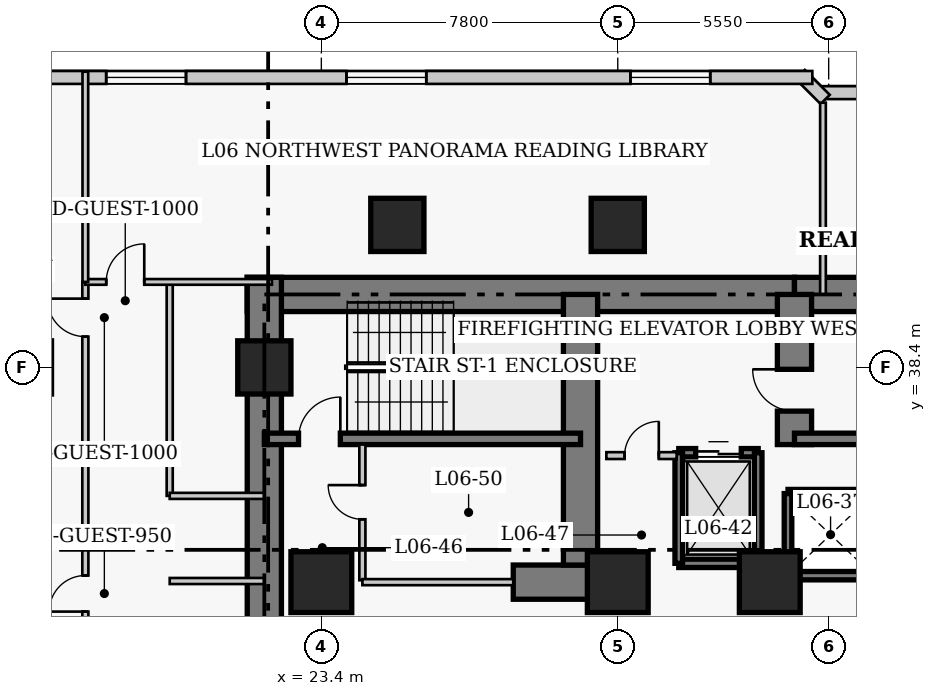
"""IFC4 building model, lengths in metres.
Left out: names, types, materials, properties, quantities, classifications, styles, units other than length and angle.
Written with IfcOpenShell. Run it as: python <this file> out.ifc"""

import sys

from ifc_helpers import new_model, si_unit, direction, frame, frame_2d, origin, origin_2d, place, context, subcontext, project, spatial, rectangle, extrude, element, fill, save


model = new_model("IFC4")
c1 = context("Model", 3, precision=1e-05, world=origin(), true_north=direction((0.0, 1.0)))
c2 = subcontext(c1, "Body", "Model", "MODEL_VIEW")
j1 = project(units=[si_unit("LENGTHUNIT", "METRE"), si_unit("PLANEANGLEUNIT", "RADIAN")], contexts=[c1])
p1 = place(None, origin())
s1 = spatial("IfcSite", under=j1, at=p1, CompositionType="ELEMENT")
p2 = place(p1, origin())
s2 = spatial("IfcBuilding", under=s1, at=p2, CompositionType="ELEMENT")
p3 = place(p2, frame((0.0, 0.0, 29.8)))
s3 = spatial("IfcBuildingStorey", under=s2, at=p3, CompositionType="ELEMENT", Elevation=29.8)
p4 = place(p3, frame((21.45, 40.32, 0.0), z_axis=(0.0, 0.0, 1.0), x_axis=(1.0, 0.0, 0.0)))
e1 = element("IfcWall", 1, at=p4, inside=s3, PredefinedType="SHEAR", context=c2, shape_type="SweptSolid", body=[
    extrude(rectangle(XDim=14.4, YDim=0.9, at=frame_2d((7.2, 0.0))), origin(), (0.0, 0.0, 1.0), 3.8),
])
p5 = place(p3, frame((35.85, 40.32, 0.0), z_axis=(0.0, 0.0, 1.0), x_axis=(1.0, 0.0, 0.0)))
e2 = element("IfcWall", 2, at=p5, inside=s3, PredefinedType="SHEAR", context=c2, shape_type="SweptSolid", body=[
    extrude(rectangle(XDim=12.6, YDim=0.9, at=frame_2d((6.3, 0.0))), origin(), (0.0, 0.0, 1.0), 3.8),
])
p6 = place(p3, frame((21.9, 27.05, 0.0), z_axis=(0.0, 0.0, 1.0), x_axis=(0.0, 1.0, 0.0)))
e3 = element("IfcWall", 3, at=p6, inside=s3, PredefinedType="SHEAR", context=c2, shape_type="SweptSolid", body=[
    extrude(rectangle(XDim=13.72, YDim=0.9, at=frame_2d((6.86, 0.0))), origin(), (0.0, 0.0, 1.0), 3.8),
])
p7 = place(p3, frame((28.45, 32.75, 0.0), z_axis=(0.0, 0.0, 1.0), x_axis=(1.0, 0.0, 0.0)))
e4 = element("IfcWall", 4, at=p7, inside=s3, PredefinedType="SHEAR", context=c2, shape_type="SweptSolid", body=[
    extrude(rectangle(XDim=2.4, YDim=0.9, at=frame_2d((1.2, 0.0))), origin(), (0.0, 0.0, 1.0), 3.8),
])
p8 = place(p3, frame((30.22, 33.2, 0.0), z_axis=(0.0, 0.0, 1.0), x_axis=(0.0, 1.0, 0.0)))
e5 = element("IfcWall", 5, at=p8, inside=s3, PredefinedType="SHEAR", context=c2, shape_type="SweptSolid", body=[
    extrude(rectangle(XDim=7.12, YDim=0.9, at=frame_2d((3.56, 0.0))), origin(), (0.0, 0.0, 1.0), 3.8),
])
p9 = place(p3, frame((35.85, 36.37, 0.0), z_axis=(0.0, 0.0, 1.0), x_axis=(0.0, 1.0, 0.0)))
e6 = element("IfcWall", 6, at=p9, inside=s3, PredefinedType="SHEAR", context=c2, shape_type="SweptSolid", body=[
    extrude(rectangle(XDim=3.95, YDim=0.9, at=frame_2d((1.975, 0.0))), origin(), (0.0, 0.0, 1.0), 3.8),
])
p10 = place(p9, frame((0.88, 0.0, 0.0)))
e7 = element("IfcOpeningElement", 7, at=p10, cuts=e6, PredefinedType="OPENING", context=c2, shape_type="SweptSolid", body=[
    extrude(rectangle(XDim=1.1, YDim=2.15, at=frame_2d((0.55, 1.075))), frame((0.0, 0.46, 0.0), z_axis=(0.0, -1.0, 0.0), x_axis=(1.0, 0.0, 0.0)), (0.0, 0.0, 1.0), 0.92),
])
p11 = place(p3, frame((21.9, 36.52, 0.0), z_axis=(0.0, 0.0, 1.0), x_axis=(1.0, 0.0, 0.0)))
e8 = element("IfcWall", 8, at=p11, inside=s3, PredefinedType="SHEAR", context=c2, shape_type="SweptSolid", body=[
    extrude(rectangle(XDim=8.32, YDim=0.3, at=frame_2d((4.16, 0.0))), origin(), (0.0, 0.0, 1.0), 3.8),
])
p12 = place(p11, frame((0.9, 0.0, 0.0)))
e9 = element("IfcOpeningElement", 9, at=p12, cuts=e8, PredefinedType="OPENING", context=c2, shape_type="SweptSolid", body=[
    extrude(rectangle(XDim=1.1, YDim=2.15, at=frame_2d((0.55, 1.075))), frame((0.0, 0.16, 0.0), z_axis=(0.0, -1.0, 0.0), x_axis=(1.0, 0.0, 0.0)), (0.0, 0.0, 1.0), 0.32),
])
p13 = place(p3, frame((35.85, 36.52, 0.0), z_axis=(0.0, 0.0, 1.0), x_axis=(1.0, 0.0, 0.0)))
e10 = element("IfcWall", 10, at=p13, inside=s3, PredefinedType="SHEAR", context=c2, shape_type="SweptSolid", body=[
    extrude(rectangle(XDim=8.33, YDim=0.3, at=frame_2d((4.165, 0.0))), origin(), (0.0, 0.0, 1.0), 3.8),
])
p14 = place(p3, frame((21.9, 38.4, 0.0), z_axis=(0.0, 0.0, 1.0), x_axis=(1.0, 0.0, 0.0)))
e11 = element("IfcColumn", 11, at=p14, inside=s3, PredefinedType="COLUMN", context=c2, shape_type="SweptSolid", body=[
    extrude(rectangle(XDim=1.4, YDim=1.4, at=origin_2d()), origin(), (0.0, 0.0, 1.0), 3.8),
])
for number, where, z_axis, x_axis in (
    (12, (23.4, 32.75, 0.0), (0.0, 0.0, 1.0), (1.0, 0.0, 0.0)),
    (13, (31.2, 32.75, 0.0), (0.0, 0.0, 1.0), (1.0, 0.0, 0.0)),
    (14, (35.2, 32.75, 0.0), (0.0, 0.0, 1.0), (1.0, 0.0, 0.0)),
):
    element("IfcColumn", number, at=place(p3, frame(where, z_axis=z_axis, x_axis=x_axis)), inside=s3, PredefinedType="COLUMN", context=c2, shape_type="SweptSolid", body=[
        extrude(rectangle(XDim=1.6, YDim=1.6, at=origin_2d()), origin(), (0.0, 0.0, 1.0), 3.8),
    ])
for number, where, z_axis, x_axis in (
    (15, (25.4, 42.15, 0.0), (0.0, 0.0, 1.0), (1.0, 0.0, 0.0)),
    (16, (31.2, 42.15, 0.0), (0.0, 0.0, 1.0), (1.0, 0.0, 0.0)),
):
    element("IfcColumn", number, at=place(p3, frame(where, z_axis=z_axis, x_axis=x_axis)), inside=s3, PredefinedType="COLUMN", context=c2, shape_type="SweptSolid", body=[
        extrude(rectangle(XDim=1.4, YDim=1.4, at=origin_2d()), origin(), (0.0, 0.0, 1.0), 3.8),
    ])
p15 = place(p3, frame((41.42, 45.63, 0.0), z_axis=(0.0, 0.0, 1.0), x_axis=(-1.0, 0.0, 0.0)))
e17 = element("IfcWall", 17, at=p15, inside=s3, PredefinedType="SOLIDWALL", context=c2, shape_type="SweptSolid", body=[
    extrude(rectangle(XDim=4.84, YDim=0.34, at=frame_2d((2.42, 0.0))), origin(), (0.0, 0.0, 1.0), 3.54),
])
p16 = place(p15, frame((1.37, 0.0, 0.85)))
e18 = element("IfcOpeningElement", 18, at=p16, cuts=e17, PredefinedType="OPENING", context=c2, shape_type="SweptSolid", body=[
    extrude(rectangle(XDim=2.1, YDim=1.85, at=frame_2d((1.05, 0.925))), frame((0.0, 0.18, 0.0), z_axis=(0.0, -1.0, 0.0), x_axis=(1.0, 0.0, 0.0)), (0.0, 0.0, 1.0), 0.36),
])
p17 = place(p3, frame((36.658, 45.451, 0.0), z_axis=(0.0, 0.0, 1.0), x_axis=(-0.707106781187, 0.707106781187, 0.0)))
e19 = element("IfcWall", 19, at=p17, inside=s3, PredefinedType="SOLIDWALL", context=c2, shape_type="SweptSolid", body=[
    extrude(rectangle(XDim=0.929, YDim=0.34, at=frame_2d((0.464, 0.0))), origin(), (0.0, 0.0, 1.0), 3.54),
])
p18 = place(p3, frame((36.32, 46.03, 0.0), z_axis=(0.0, 0.0, 1.0), x_axis=(-1.0, 0.0, 0.0)))
e20 = element("IfcWall", 20, at=p18, inside=s3, PredefinedType="SOLIDWALL", context=c2, shape_type="SweptSolid", body=[
    extrude(rectangle(XDim=29.89, YDim=0.34, at=frame_2d((14.945, 0.0))), origin(), (0.0, 0.0, 1.0), 3.54),
])
p19 = place(p18, frame((2.686, 0.0, 0.85)))
e21 = element("IfcOpeningElement", 21, at=p19, cuts=e20, PredefinedType="OPENING", context=c2, shape_type="SweptSolid", body=[
    extrude(rectangle(XDim=2.1, YDim=1.85, at=frame_2d((1.05, 0.925))), frame((0.0, 0.18, 0.0), z_axis=(0.0, -1.0, 0.0), x_axis=(1.0, 0.0, 0.0)), (0.0, 0.0, 1.0), 0.36),
])
p20 = place(p18, frame((10.159, 0.0, 0.85)))
e22 = element("IfcOpeningElement", 22, at=p20, cuts=e20, PredefinedType="OPENING", context=c2, shape_type="SweptSolid", body=[
    extrude(rectangle(XDim=2.1, YDim=1.85, at=frame_2d((1.05, 0.925))), frame((0.0, 0.18, 0.0), z_axis=(0.0, -1.0, 0.0), x_axis=(1.0, 0.0, 0.0)), (0.0, 0.0, 1.0), 0.36),
])
p21 = place(p18, frame((16.481, 0.0, 0.85)))
e23 = element("IfcOpeningElement", 23, at=p21, cuts=e20, PredefinedType="OPENING", context=c2, shape_type="SweptSolid", body=[
    extrude(rectangle(XDim=2.1, YDim=1.85, at=frame_2d((1.05, 0.925))), frame((0.0, 0.18, 0.0), z_axis=(0.0, -1.0, 0.0), x_axis=(1.0, 0.0, 0.0)), (0.0, 0.0, 1.0), 0.36),
])
p22 = place(p18, frame((25.104, 0.0, 0.85)))
e24 = element("IfcOpeningElement", 24, at=p22, cuts=e20, PredefinedType="OPENING", context=c2, shape_type="SweptSolid", body=[
    extrude(rectangle(XDim=2.1, YDim=1.85, at=frame_2d((1.05, 0.925))), frame((0.0, 0.18, 0.0), z_axis=(0.0, -1.0, 0.0), x_axis=(1.0, 0.0, 0.0)), (0.0, 0.0, 1.0), 0.36),
])
for number, where, z_axis, x_axis in (
    (25, (35.68, 35.08, 0.0), (0.0, 0.0, 1.0), (1.0, 0.0, 0.0)),
    (26, (35.68, 32.92, 0.0), (0.0, 0.0, 1.0), (1.0, 0.0, 0.0)),
):
    element("IfcWall", number, at=place(p3, frame(where, z_axis=z_axis, x_axis=x_axis)), inside=s3, PredefinedType="SHEAR", context=c2, shape_type="SweptSolid", body=[
        extrude(rectangle(XDim=2.32, YDim=0.22, at=frame_2d((1.16, 0.0))), origin(), (0.0, 0.0, 1.0), 3.8),
    ])
p23 = place(p3, frame((35.68, 32.92, 0.0), z_axis=(0.0, 0.0, 1.0), x_axis=(0.0, 1.0, 0.0)))
e27 = element("IfcWall", 27, at=p23, inside=s3, PredefinedType="SHEAR", context=c2, shape_type="SweptSolid", body=[
    extrude(rectangle(XDim=2.16, YDim=0.2, at=frame_2d((1.08, 0.0))), origin(), (0.0, 0.0, 1.0), 3.8),
])
p24 = place(p3, frame((32.805, 36.155, 0.0), z_axis=(0.0, 0.0, 1.0), x_axis=(1.0, 0.0, 0.0)))
e28 = element("IfcWall", 28, at=p24, inside=s3, PredefinedType="SHEAR", context=c2, shape_type="SweptSolid", body=[
    extrude(rectangle(XDim=2.09, YDim=0.22, at=frame_2d((1.045, 0.0))), origin(), (0.0, 0.0, 1.0), 3.8),
])
p25 = place(p24, frame((0.445, 0.0, 0.0)))
e29 = element("IfcOpeningElement", 29, at=p25, cuts=e28, PredefinedType="OPENING", context=c2, shape_type="SweptSolid", body=[
    extrude(rectangle(XDim=1.2, YDim=2.15, at=frame_2d((0.6, 1.075))), frame((0.0, 0.12, 0.0), z_axis=(0.0, -1.0, 0.0), x_axis=(1.0, 0.0, 0.0)), (0.0, 0.0, 1.0), 0.24),
])
p26 = place(p3, frame((32.805, 33.245, 0.0), z_axis=(0.0, 0.0, 1.0), x_axis=(1.0, 0.0, 0.0)))
e30 = element("IfcWall", 30, at=p26, inside=s3, PredefinedType="SHEAR", context=c2, shape_type="SweptSolid", body=[
    extrude(rectangle(XDim=2.09, YDim=0.22, at=frame_2d((1.045, 0.0))), origin(), (0.0, 0.0, 1.0), 3.8),
])
for number, where, z_axis, x_axis in (
    (31, (32.805, 33.245, 0.0), (0.0, 0.0, 1.0), (0.0, 1.0, 0.0)),
    (32, (34.895, 33.245, 0.0), (0.0, 0.0, 1.0), (0.0, 1.0, 0.0)),
):
    element("IfcWall", number, at=place(p3, frame(where, z_axis=z_axis, x_axis=x_axis)), inside=s3, PredefinedType="SHEAR", context=c2, shape_type="SweptSolid", body=[
        extrude(rectangle(XDim=2.91, YDim=0.2, at=frame_2d((1.455, 0.0))), origin(), (0.0, 0.0, 1.0), 3.8),
    ])
p27 = place(p3, frame((30.9, 36.08, 0.0), z_axis=(0.0, 0.0, 1.0), x_axis=(1.0, 0.0, 0.0)))
e33 = element("IfcWall", 33, at=p27, inside=s3, PredefinedType="PARTITIONING", context=c2, shape_type="SweptSolid", body=[
    extrude(rectangle(XDim=1.85, YDim=0.18, at=frame_2d((0.925, 0.0))), origin(), (0.0, 0.0, 1.0), 3.54),
])
p28 = place(p27, frame((0.48, 0.0, 0.0)))
e34 = element("IfcOpeningElement", 34, at=p28, cuts=e33, PredefinedType="OPENING", context=c2, shape_type="SweptSolid", body=[
    extrude(rectangle(XDim=0.9, YDim=2.15, at=frame_2d((0.45, 1.075))), frame((0.0, 0.1, 0.0), z_axis=(0.0, -1.0, 0.0), x_axis=(1.0, 0.0, 0.0)), (0.0, 0.0, 1.0), 0.2),
])
p29 = place(p3, frame((24.48, 32.8, 0.0), z_axis=(0.0, 0.0, 1.0), x_axis=(0.0, 1.0, 0.0)))
e35 = element("IfcWall", 35, at=p29, inside=s3, PredefinedType="PARTITIONING", context=c2, shape_type="SweptSolid", body=[
    extrude(rectangle(XDim=3.57, YDim=0.16, at=frame_2d((1.785, 0.0))), origin(), (0.0, 0.0, 1.0), 3.54),
])
p30 = place(p29, frame((1.604, 0.0, 0.0)))
e36 = element("IfcOpeningElement", 36, at=p30, cuts=e35, PredefinedType="OPENING", context=c2, shape_type="SweptSolid", body=[
    extrude(rectangle(XDim=0.9, YDim=2.1, at=frame_2d((0.45, 1.05))), frame((0.0, 0.09, 0.0), z_axis=(0.0, -1.0, 0.0), x_axis=(1.0, 0.0, 0.0)), (0.0, 0.0, 1.0), 0.18),
])
p31 = place(p3, frame((24.48, 32.75, 0.0), z_axis=(0.0, 0.0, 1.0), x_axis=(1.0, 0.0, 0.0)))
e37 = element("IfcWall", 37, at=p31, inside=s3, PredefinedType="PARTITIONING", context=c2, shape_type="SweptSolid", body=[
    extrude(rectangle(XDim=3.97, YDim=0.16, at=frame_2d((1.985, 0.0))), origin(), (0.0, 0.0, 1.0), 3.54),
])
p32 = place(p3, frame((17.19, 5.05, 0.0), z_axis=(0.0, 0.0, 1.0), x_axis=(0.0, 1.0, 0.0)))
e38 = element("IfcWall", 38, at=p32, inside=s3, PredefinedType="PARTITIONING", context=c2, shape_type="SweptSolid", body=[
    extrude(rectangle(XDim=35.6, YDim=0.16, at=frame_2d((17.8, 0.0))), origin(), (0.0, 0.0, 1.0), 3.54),
])
p33 = place(p32, frame((2.6, 0.0, 0.0)))
e39 = element("IfcOpeningElement", 39, at=p33, cuts=e38, PredefinedType="OPENING", context=c2, shape_type="SweptSolid", body=[
    extrude(rectangle(XDim=0.95, YDim=2.1, at=frame_2d((0.475, 1.05))), frame((0.0, 0.09, 0.0), z_axis=(0.0, -1.0, 0.0), x_axis=(1.0, 0.0, 0.0)), (0.0, 0.0, 1.0), 0.18),
])
p34 = place(p32, frame((10.075, 0.0, 0.0)))
e40 = element("IfcOpeningElement", 40, at=p34, cuts=e38, PredefinedType="OPENING", context=c2, shape_type="SweptSolid", body=[
    extrude(rectangle(XDim=0.95, YDim=2.1, at=frame_2d((0.475, 1.05))), frame((0.0, 0.09, 0.0), z_axis=(0.0, -1.0, 0.0), x_axis=(1.0, 0.0, 0.0)), (0.0, 0.0, 1.0), 0.18),
])
p35 = place(p32, frame((18.875, 0.0, 0.0)))
e41 = element("IfcOpeningElement", 41, at=p35, cuts=e38, PredefinedType="OPENING", context=c2, shape_type="SweptSolid", body=[
    extrude(rectangle(XDim=0.95, YDim=2.1, at=frame_2d((0.475, 1.05))), frame((0.0, 0.09, 0.0), z_axis=(0.0, -1.0, 0.0), x_axis=(1.0, 0.0, 0.0)), (0.0, 0.0, 1.0), 0.18),
])
p36 = place(p32, frame((26.925, 0.0, 0.0)))
e42 = element("IfcOpeningElement", 42, at=p36, cuts=e38, PredefinedType="OPENING", context=c2, shape_type="SweptSolid", body=[
    extrude(rectangle(XDim=0.95, YDim=2.1, at=frame_2d((0.475, 1.05))), frame((0.0, 0.09, 0.0), z_axis=(0.0, -1.0, 0.0), x_axis=(1.0, 0.0, 0.0)), (0.0, 0.0, 1.0), 0.18),
])
p37 = place(p32, frame((34.16, 0.0, 0.0)))
e43 = element("IfcOpeningElement", 43, at=p37, cuts=e38, PredefinedType="OPENING", context=c2, shape_type="SweptSolid", body=[
    extrude(rectangle(XDim=1.0, YDim=2.15, at=frame_2d((0.5, 1.075))), frame((0.0, 0.09, 0.0), z_axis=(0.0, -1.0, 0.0), x_axis=(1.0, 0.0, 0.0)), (0.0, 0.0, 1.0), 0.18),
])
p38 = place(p3, frame((19.41, 35.02, 0.0), z_axis=(0.0, 0.0, 1.0), x_axis=(0.0, 1.0, 0.0)))
e44 = element("IfcWall", 44, at=p38, inside=s3, PredefinedType="PARTITIONING", context=c2, shape_type="SweptSolid", body=[
    extrude(rectangle(XDim=5.63, YDim=0.16, at=frame_2d((2.815, 0.0))), origin(), (0.0, 0.0, 1.0), 3.54),
])
for number, where, z_axis, x_axis in (
    (45, (19.41, 35.02, 0.0), (0.0, 0.0, 1.0), (1.0, 0.0, 0.0)),
    (46, (19.41, 32.78, 0.0), (0.0, 0.0, 1.0), (1.0, 0.0, 0.0)),
):
    element("IfcWall", number, at=place(p3, frame(where, z_axis=z_axis, x_axis=x_axis)), inside=s3, PredefinedType="PARTITIONING", context=c2, shape_type="SweptSolid", body=[
        extrude(rectangle(XDim=2.49, YDim=0.16, at=frame_2d((1.245, 0.0))), origin(), (0.0, 0.0, 1.0), 3.54),
    ])
p39 = place(p3, frame((17.19, 40.65, 0.0), z_axis=(0.0, 0.0, 1.0), x_axis=(1.0, 0.0, 0.0)))
e47 = element("IfcWall", 47, at=p39, inside=s3, PredefinedType="PARTITIONING", context=c2, shape_type="SweptSolid", body=[
    extrude(rectangle(XDim=4.91, YDim=0.15, at=frame_2d((2.455, 0.0))), origin(), (0.0, 0.0, 1.0), 3.54),
])
p40 = place(p39, frame((0.55, 0.0, 0.0)))
e48 = element("IfcOpeningElement", 48, at=p40, cuts=e47, PredefinedType="OPENING", context=c2, shape_type="SweptSolid", body=[
    extrude(rectangle(XDim=1.0, YDim=2.15, at=frame_2d((0.5, 1.075))), frame((0.0, 0.085, 0.0), z_axis=(0.0, -1.0, 0.0), x_axis=(1.0, 0.0, 0.0)), (0.0, 0.0, 1.0), 0.17),
])
p41 = place(p3, frame((17.19, 40.65, 0.0), z_axis=(0.0, 0.0, 1.0), x_axis=(0.0, 1.0, 0.0)))
e49 = element("IfcWall", 49, at=p41, inside=s3, PredefinedType="PARTITIONING", context=c2, shape_type="SweptSolid", body=[
    extrude(rectangle(XDim=5.53, YDim=0.15, at=frame_2d((2.765, 0.0))), origin(), (0.0, 0.0, 1.0), 3.54),
])
p42 = place(p3, frame((36.6, 40.32, 0.0), z_axis=(0.0, 0.0, 1.0), x_axis=(0.0, 1.0, 0.0)))
e50 = element("IfcWall", 50, at=p42, inside=s3, PredefinedType="PARTITIONING", context=c2, shape_type="SweptSolid", body=[
    extrude(rectangle(XDim=5.045, YDim=0.15, at=frame_2d((2.522, 0.0))), origin(), (0.0, 0.0, 1.0), 3.54),
])
p43 = place(p3, frame((14.45, 36.1, 0.0), z_axis=(0.0, 0.0, 1.0), x_axis=(1.0, 0.0, 0.0)))
e51 = element("IfcWall", 51, at=p43, inside=s3, PredefinedType="PARTITIONING", context=c2, shape_type="SweptSolid", body=[
    extrude(rectangle(XDim=2.74, YDim=0.15, at=frame_2d((1.37, 0.0))), origin(), (0.0, 0.0, 1.0), 3.54),
])
p44 = place(p19, origin())
e52 = element("IfcWindow", 52, at=p44, inside=s3, PartitioningType="SINGLE_PANEL", PredefinedType="WINDOW", context=c2, shape_type="SweptSolid", body=[
    extrude(rectangle(XDim=2.1, YDim=1.85, at=frame_2d((1.05, 0.925))), frame((0.0, 0.03, 0.0), z_axis=(0.0, -1.0, 0.0), x_axis=(1.0, 0.0, 0.0)), (0.0, 0.0, 1.0), 0.06),
])
fill(e21, e52)
p45 = place(p20, origin())
e53 = element("IfcWindow", 53, at=p45, inside=s3, PartitioningType="SINGLE_PANEL", PredefinedType="WINDOW", context=c2, shape_type="SweptSolid", body=[
    extrude(rectangle(XDim=2.1, YDim=1.85, at=frame_2d((1.05, 0.925))), frame((0.0, 0.03, 0.0), z_axis=(0.0, -1.0, 0.0), x_axis=(1.0, 0.0, 0.0)), (0.0, 0.0, 1.0), 0.06),
])
fill(e22, e53)
p46 = place(p21, origin())
e54 = element("IfcWindow", 54, at=p46, inside=s3, PartitioningType="SINGLE_PANEL", PredefinedType="WINDOW", context=c2, shape_type="SweptSolid", body=[
    extrude(rectangle(XDim=2.1, YDim=1.85, at=frame_2d((1.05, 0.925))), frame((0.0, 0.03, 0.0), z_axis=(0.0, -1.0, 0.0), x_axis=(1.0, 0.0, 0.0)), (0.0, 0.0, 1.0), 0.06),
])
fill(e23, e54)
p47 = place(p25, origin())
e55 = element("IfcDoor", 55, at=p47, inside=s3, OperationType="DOUBLE_DOOR_SLIDING", PredefinedType="DOOR", context=c2, shape_type="SweptSolid", body=[
    extrude(rectangle(XDim=1.2, YDim=2.15, at=frame_2d((0.6, 1.075))), frame((0.0, 0.025, 0.0), z_axis=(0.0, -1.0, 0.0), x_axis=(1.0, 0.0, 0.0)), (0.0, 0.0, 1.0), 0.05),
])
fill(e29, e55)
p48 = place(p28, origin())
e56 = element("IfcDoor", 56, at=p48, inside=s3, OperationType="SINGLE_SWING_RIGHT", PredefinedType="DOOR", context=c2, shape_type="SweptSolid", body=[
    extrude(rectangle(XDim=0.9, YDim=2.15, at=frame_2d((0.45, 1.075))), frame((0.0, 0.025, 0.0), z_axis=(0.0, -1.0, 0.0), x_axis=(1.0, 0.0, 0.0)), (0.0, 0.0, 1.0), 0.05),
])
fill(e34, e56)
p49 = place(p30, origin())
e57 = element("IfcDoor", 57, at=p49, inside=s3, OperationType="SINGLE_SWING_RIGHT", PredefinedType="DOOR", context=c2, shape_type="SweptSolid", body=[
    extrude(rectangle(XDim=0.9, YDim=2.1, at=frame_2d((0.45, 1.05))), frame((0.0, 0.025, 0.0), z_axis=(0.0, -1.0, 0.0), x_axis=(1.0, 0.0, 0.0)), (0.0, 0.0, 1.0), 0.05),
])
fill(e36, e57)
p50 = place(p40, origin())
e58 = element("IfcDoor", 58, at=p50, inside=s3, OperationType="SINGLE_SWING_RIGHT", PredefinedType="DOOR", context=c2, shape_type="SweptSolid", body=[
    extrude(rectangle(XDim=1.0, YDim=2.15, at=frame_2d((0.5, 1.075))), frame((0.0, 0.025, 0.0), z_axis=(0.0, -1.0, 0.0), x_axis=(1.0, 0.0, 0.0)), (0.0, 0.0, 1.0), 0.05),
])
fill(e48, e58)
p51 = place(p36, origin())
e59 = element("IfcDoor", 59, at=p51, inside=s3, OperationType="SINGLE_SWING_LEFT", PredefinedType="DOOR", context=c2, shape_type="SweptSolid", body=[
    extrude(rectangle(XDim=0.95, YDim=2.1, at=frame_2d((0.475, 1.05))), frame((0.0, 0.025, 0.0), z_axis=(0.0, -1.0, 0.0), x_axis=(1.0, 0.0, 0.0)), (0.0, 0.0, 1.0), 0.05),
])
fill(e42, e59)
p52 = place(p37, origin())
e60 = element("IfcDoor", 60, at=p52, inside=s3, OperationType="SINGLE_SWING_RIGHT", PredefinedType="DOOR", context=c2, shape_type="SweptSolid", body=[
    extrude(rectangle(XDim=1.0, YDim=2.15, at=frame_2d((0.5, 1.075))), frame((0.0, 0.025, 0.0), z_axis=(0.0, -1.0, 0.0), x_axis=(1.0, 0.0, 0.0)), (0.0, 0.0, 1.0), 0.05),
])
fill(e43, e60)
p53 = place(p12, origin())
e61 = element("IfcDoor", 61, at=p53, inside=s3, OperationType="SINGLE_SWING_RIGHT", PredefinedType="DOOR", context=c2, shape_type="SweptSolid", body=[
    extrude(rectangle(XDim=1.1, YDim=2.15, at=frame_2d((0.55, 1.075))), frame((0.0, 0.025, 0.0), z_axis=(0.0, -1.0, 0.0), x_axis=(1.0, 0.0, 0.0)), (0.0, 0.0, 1.0), 0.05),
])
fill(e9, e61)
p54 = place(p10, origin())
e62 = element("IfcDoor", 62, at=p54, inside=s3, OperationType="SINGLE_SWING_RIGHT", PredefinedType="DOOR", context=c2, shape_type="SweptSolid", body=[
    extrude(rectangle(XDim=1.1, YDim=2.15, at=frame_2d((0.55, 1.075))), frame((0.0, 0.025, 0.0), z_axis=(0.0, -1.0, 0.0), x_axis=(1.0, 0.0, 0.0)), (0.0, 0.0, 1.0), 0.05),
])
fill(e7, e62)
save(model, sys.argv[1])
